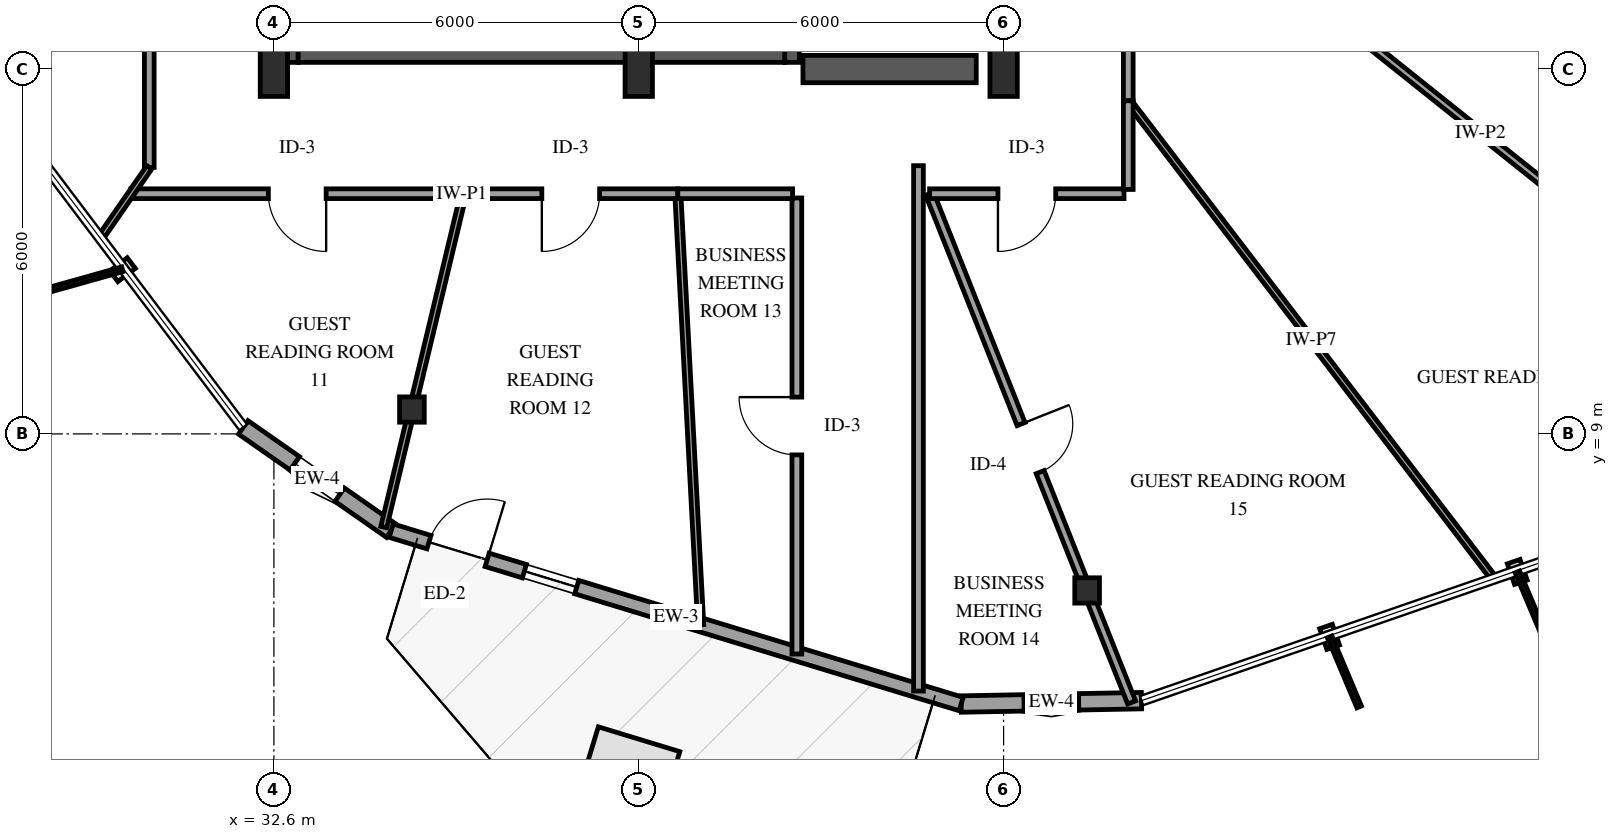
"""IFC4 building model, lengths in metres.
Left out: names, types, materials, properties, quantities, classifications, styles, units other than length and angle.
Written with IfcOpenShell. Run it as: python <this file> out.ifc"""

import sys

from ifc_helpers import new_model, si_unit, direction, frame, frame_2d, origin, origin_2d, place, context, subcontext, project, spatial, rectangle, i_section, extrude, element, fill, save


model = new_model("IFC4")
c1 = context("Model", 3, precision=1e-05, world=origin(), true_north=direction((0.0, 1.0)))
c2 = subcontext(c1, "Body", "Model", "MODEL_VIEW")
j1 = project(units=[si_unit("LENGTHUNIT", "METRE"), si_unit("PLANEANGLEUNIT", "RADIAN")], contexts=[c1])
p1 = place(None, origin())
s1 = spatial("IfcSite", under=j1, at=p1, CompositionType="ELEMENT")
p2 = place(p1, origin())
s2 = spatial("IfcBuilding", under=s1, at=p2, CompositionType="ELEMENT")
p3 = place(p2, frame((0.0, 0.0, 233.8)))
s3 = spatial("IfcBuildingStorey", under=s2, at=p3, CompositionType="ELEMENT", Elevation=233.8)
p4 = place(p3, frame((32.88, 15.11, 0.0), z_axis=(0.0, 0.0, 1.0), x_axis=(0.0, 1.0, 0.0)))
e1 = element("IfcWall", 1, at=p4, inside=s3, PredefinedType="SHEAR", context=c2, shape_type="SweptSolid", body=[
    extrude(rectangle(XDim=3.63, YDim=0.24, at=frame_2d((1.815, 0.0))), origin(), (0.0, 0.0, 1.0), 3.6),
])
p5 = place(p3, frame((41.12, 15.11, 0.0), z_axis=(0.0, 0.0, 1.0), x_axis=(0.0, 1.0, 0.0)))
e2 = element("IfcWall", 2, at=p5, inside=s3, PredefinedType="SHEAR", context=c2, shape_type="SweptSolid", body=[
    extrude(rectangle(XDim=3.63, YDim=0.24, at=frame_2d((1.815, 0.0))), origin(), (0.0, 0.0, 1.0), 3.6),
])
p6 = place(p5, frame((1.255, 0.0, 0.0)))
e3 = element("IfcOpeningElement", 3, at=p6, cuts=e2, PredefinedType="OPENING", context=c2, shape_type="SweptSolid", body=[
    extrude(rectangle(XDim=1.12, YDim=2.15, at=frame_2d((0.56, 1.075))), frame((0.0, 0.13, 0.0), z_axis=(0.0, -1.0, 0.0), x_axis=(1.0, 0.0, 0.0)), (0.0, 0.0, 1.0), 0.26),
])
p7 = place(p3, frame((33.0, 15.23, 0.0), z_axis=(0.0, 0.0, 1.0), x_axis=(1.0, 0.0, 0.0)))
e4 = element("IfcWall", 4, at=p7, inside=s3, PredefinedType="SHEAR", context=c2, shape_type="SweptSolid", body=[
    extrude(rectangle(XDim=8.0, YDim=0.24, at=frame_2d((4.0, 0.0))), origin(), (0.0, 0.0, 1.0), 3.6),
])
p8 = place(p3, frame((41.3, 15.0, 0.0), z_axis=(0.0, 0.0, 1.0), x_axis=(1.0, 0.0, 0.0)))
e5 = element("IfcWall", 5, at=p8, inside=s3, PredefinedType="SHEAR", context=c2, shape_type="SweptSolid", body=[
    extrude(rectangle(XDim=2.85, YDim=0.45, at=frame_2d((1.425, 0.0))), origin(), (0.0, 0.0, 1.0), 3.6),
])
for number, where, z_axis, x_axis in (
    (6, (32.6, 15.0, 0.0), (0.0, 0.0, 1.0), (1.0, 0.0, 0.0)),
    (7, (38.6, 15.0, 0.0), (0.0, 0.0, 1.0), (1.0, 0.0, 0.0)),
    (8, (44.6, 15.0, 0.0), (0.0, 0.0, 1.0), (1.0, 0.0, 0.0)),
):
    element("IfcColumn", number, at=place(p3, frame(where, z_axis=z_axis, x_axis=x_axis)), inside=s3, PredefinedType="PILASTER", context=c2, shape_type="SweptSolid", body=[
        extrude(rectangle(XDim=0.45, YDim=0.9, at=origin_2d()), origin(), (0.0, 0.0, 1.0), 3.6),
    ])
for number, where, z_axis, x_axis in (
    (9, (34.87, 9.401, 0.0), (0.0, 0.0, 1.0), (1.0, 0.0, 0.0)),
    (10, (45.973, 6.426, 0.0), (0.0, 0.0, 1.0), (1.0, 0.0, 0.0)),
):
    element("IfcColumn", number, at=place(p3, frame(where, z_axis=z_axis, x_axis=x_axis)), inside=s3, PredefinedType="COLUMN", context=c2, shape_type="SweptSolid", body=[
        extrude(i_section(OverallWidth=0.406, OverallDepth=0.416, WebThickness=0.03, FlangeThickness=0.048, FilletRadius=0.038, at=origin_2d()), origin(), (0.0, 0.0, 1.0), 3.6),
    ])
p9 = place(p3, frame((32.096, 9.107, 0.0), z_axis=(0.0, 0.0, 1.0), x_axis=(0.81995808367, -0.572423567845, 0.0)))
e11 = element("IfcWall", 11, at=p9, inside=s3, PredefinedType="SOLIDWALL", context=c2, shape_type="SweptSolid", body=[
    extrude(rectangle(XDim=2.967, YDim=0.27, at=frame_2d((1.483, 0.0))), origin(), (0.0, 0.0, 1.0), 2.599),
])
p10 = place(p9, frame((1.033, 0.0, 0.75)))
e12 = element("IfcOpeningElement", 12, at=p10, cuts=e11, PredefinedType="OPENING", context=c2, shape_type="SweptSolid", body=[
    extrude(rectangle(XDim=0.9, YDim=1.5, at=frame_2d((0.45, 0.75))), frame((0.0, 0.145, 0.0), z_axis=(0.0, -1.0, 0.0), x_axis=(1.0, 0.0, 0.0)), (0.0, 0.0, 1.0), 0.29),
])
p11 = place(p3, frame((43.902, 4.558, 0.0), z_axis=(0.0, 0.0, 1.0), x_axis=(0.999822399495, 0.018845940364, 0.0)))
e13 = element("IfcWall", 13, at=p11, inside=s3, PredefinedType="SOLIDWALL", context=c2, shape_type="SweptSolid", body=[
    extrude(rectangle(XDim=2.967, YDim=0.27, at=frame_2d((1.483, 0.0))), origin(), (0.0, 0.0, 1.0), 2.599),
])
p12 = place(p11, frame((1.033, 0.0, 0.75)))
e14 = element("IfcOpeningElement", 14, at=p12, cuts=e13, PredefinedType="OPENING", context=c2, shape_type="SweptSolid", body=[
    extrude(rectangle(XDim=0.9, YDim=1.5, at=frame_2d((0.45, 0.75))), frame((0.0, 0.145, 0.0), z_axis=(0.0, -1.0, 0.0), x_axis=(1.0, 0.0, 0.0)), (0.0, 0.0, 1.0), 0.29),
])
p13 = place(p3, frame((34.528, 7.409, 0.0), z_axis=(0.0, 0.0, 1.0), x_axis=(0.956709483024, -0.29104461014, 0.0)))
e15 = element("IfcWall", 15, at=p13, inside=s3, PredefinedType="SOLIDWALL", context=c2, shape_type="SweptSolid", body=[
    extrude(rectangle(XDim=9.798, YDim=0.23, at=frame_2d((4.899, 0.0))), origin(), (0.0, 0.0, 1.0), 2.599),
])
p14 = place(p13, frame((0.65, 0.0, 0.0)))
e16 = element("IfcOpeningElement", 16, at=p14, cuts=e15, PredefinedType="OPENING", context=c2, shape_type="SweptSolid", body=[
    extrude(rectangle(XDim=1.0, YDim=2.15, at=frame_2d((0.5, 1.075))), frame((0.0, 0.125, 0.0), z_axis=(0.0, -1.0, 0.0), x_axis=(1.0, 0.0, 0.0)), (0.0, 0.0, 1.0), 0.25),
])
p15 = place(p13, frame((2.29, 0.0, 0.72)))
e17 = element("IfcOpeningElement", 17, at=p15, cuts=e15, PredefinedType="OPENING", context=c2, shape_type="SweptSolid", body=[
    extrude(rectangle(XDim=0.9, YDim=1.5, at=frame_2d((0.45, 0.75))), frame((0.0, 0.125, 0.0), z_axis=(0.0, -1.0, 0.0), x_axis=(1.0, 0.0, 0.0)), (0.0, 0.0, 1.0), 0.25),
])
p16 = place(p3, frame((46.65, 18.573, 0.0), z_axis=(0.0, 0.0, 1.0), x_axis=(0.781506613228, -0.623896957423, 0.0)))
e18 = element("IfcWall", 18, at=p16, inside=s3, PredefinedType="PARTITIONING", context=c2, shape_type="SweptSolid", body=[
    extrude(rectangle(XDim=14.816, YDim=0.12, at=frame_2d((7.408, 0.0))), origin(), (0.0, 0.0, 1.0), 3.26),
])
p17 = place(p3, frame((46.65, 14.478, 0.0), z_axis=(0.0, 0.0, 1.0), x_axis=(0.60761033938, -0.794235277156, 0.0)))
e19 = element("IfcWall", 19, at=p17, inside=s3, PredefinedType="PARTITIONING", context=c2, shape_type="SweptSolid", body=[
    extrude(rectangle(XDim=9.896, YDim=0.1, at=frame_2d((4.948, 0.0))), origin(), (0.0, 0.0, 1.0), 3.26),
])
p18 = place(p3, frame((43.383, 12.95, 0.0), z_axis=(0.0, 0.0, 1.0), x_axis=(0.369056032082, -0.929407147156, 0.0)))
e20 = element("IfcWall", 20, at=p18, inside=s3, PredefinedType="PARTITIONING", context=c2, shape_type="SweptSolid", body=[
    extrude(rectangle(XDim=9.001, YDim=0.14, at=frame_2d((4.501, 0.0))), origin(), (0.0, 0.0, 1.0), 2.515),
])
p19 = place(p18, frame((4.076, 0.0, 0.0)))
e21 = element("IfcOpeningElement", 21, at=p19, cuts=e20, PredefinedType="OPENING", context=c2, shape_type="SweptSolid", body=[
    extrude(rectangle(XDim=0.85, YDim=2.1, at=frame_2d((0.425, 1.05))), frame((0.0, 0.08, 0.0), z_axis=(0.0, -1.0, 0.0), x_axis=(1.0, 0.0, 0.0)), (0.0, 0.0, 1.0), 0.16),
])
p20 = place(p3, frame((41.2, 5.38, 0.0), z_axis=(0.0, 0.0, 1.0), x_axis=(0.0, 1.0, 0.0)))
e22 = element("IfcWall", 22, at=p20, inside=s3, PredefinedType="PARTITIONING", context=c2, shape_type="SweptSolid", body=[
    extrude(rectangle(XDim=7.5, YDim=0.16, at=frame_2d((3.75, 0.0))), origin(), (0.0, 0.0, 1.0), 3.26),
])
p21 = place(p20, frame((3.275, 0.0, 0.0)))
e23 = element("IfcOpeningElement", 23, at=p21, cuts=e22, PredefinedType="OPENING", context=c2, shape_type="SweptSolid", body=[
    extrude(rectangle(XDim=0.95, YDim=2.15, at=frame_2d((0.475, 1.075))), frame((0.0, 0.09, 0.0), z_axis=(0.0, -1.0, 0.0), x_axis=(1.0, 0.0, 0.0)), (0.0, 0.0, 1.0), 0.18),
])
p22 = place(p3, frame((39.242, 12.95, 0.0), z_axis=(0.0, 0.0, 1.0), x_axis=(0.053100347705, -0.998589181332, 0.0)))
e24 = element("IfcWall", 24, at=p22, inside=s3, PredefinedType="PARTITIONING", context=c2, shape_type="SweptSolid", body=[
    extrude(rectangle(XDim=7.099, YDim=0.1, at=frame_2d((3.549, 0.0))), origin(), (0.0, 0.0, 1.0), 3.26),
])
p23 = place(p3, frame((30.55, 13.383, 0.0), z_axis=(0.0, 0.0, 1.0), x_axis=(0.0, 1.0, 0.0)))
e25 = element("IfcWall", 25, at=p23, inside=s3, PredefinedType="PARTITIONING", context=c2, shape_type="SweptSolid", body=[
    extrude(rectangle(XDim=6.723, YDim=0.16, at=frame_2d((3.361, 0.0))), origin(), (0.0, 0.0, 1.0), 3.26),
])
p24 = place(p23, frame((2.887, 0.0, 0.0)))
e26 = element("IfcOpeningElement", 26, at=p24, cuts=e25, PredefinedType="OPENING", context=c2, shape_type="SweptSolid", body=[
    extrude(rectangle(XDim=0.95, YDim=2.15, at=frame_2d((0.475, 1.075))), frame((0.0, 0.09, 0.0), z_axis=(0.0, -1.0, 0.0), x_axis=(1.0, 0.0, 0.0)), (0.0, 0.0, 1.0), 0.18),
])
p25 = place(p3, frame((35.719, 12.95, 0.0), z_axis=(0.0, 0.0, 1.0), x_axis=(-0.232760243662, -0.972534147971, 0.0)))
e27 = element("IfcWall", 27, at=p25, inside=s3, PredefinedType="PARTITIONING", context=c2, shape_type="SweptSolid", body=[
    extrude(rectangle(XDim=5.637, YDim=0.1, at=frame_2d((2.818, 0.0))), origin(), (0.0, 0.0, 1.0), 2.515),
])
p26 = place(p3, frame((35.719, 12.95, 0.0), z_axis=(0.0, 0.0, 1.0), x_axis=(-1.0, 0.0, 0.0)))
e28 = element("IfcWall", 28, at=p26, inside=s3, PredefinedType="PARTITIONING", context=c2, shape_type="SweptSolid", body=[
    extrude(rectangle(XDim=5.469, YDim=0.16, at=frame_2d((2.734, 0.0))), origin(), (0.0, 0.0, 1.0), 3.26),
])
p27 = place(p26, frame((2.26, 0.0, 0.0)))
e29 = element("IfcOpeningElement", 29, at=p27, cuts=e28, PredefinedType="OPENING", context=c2, shape_type="SweptSolid", body=[
    extrude(rectangle(XDim=0.95, YDim=2.15, at=frame_2d((0.475, 1.075))), frame((0.0, 0.09, 0.0), z_axis=(0.0, -1.0, 0.0), x_axis=(1.0, 0.0, 0.0)), (0.0, 0.0, 1.0), 0.18),
])
p28 = place(p3, frame((46.65, 18.573, 0.0), z_axis=(0.0, 0.0, 1.0), x_axis=(0.0, -1.0, 0.0)))
e30 = element("IfcWall", 30, at=p28, inside=s3, PredefinedType="PARTITIONING", context=c2, shape_type="SweptSolid", body=[
    extrude(rectangle(XDim=4.095, YDim=0.16, at=frame_2d((2.047, 0.0))), origin(), (0.0, 0.0, 1.0), 3.26),
])
p29 = place(p28, frame((1.573, 0.0, 0.0)))
e31 = element("IfcOpeningElement", 31, at=p29, cuts=e30, PredefinedType="OPENING", context=c2, shape_type="SweptSolid", body=[
    extrude(rectangle(XDim=0.95, YDim=2.15, at=frame_2d((0.475, 1.075))), frame((0.0, 0.09, 0.0), z_axis=(0.0, -1.0, 0.0), x_axis=(1.0, 0.0, 0.0)), (0.0, 0.0, 1.0), 0.18),
])
p30 = place(p3, frame((39.242, 12.95, 0.0), z_axis=(0.0, 0.0, 1.0), x_axis=(-1.0, 0.0, 0.0)))
e32 = element("IfcWall", 32, at=p30, inside=s3, PredefinedType="PARTITIONING", context=c2, shape_type="SweptSolid", body=[
    extrude(rectangle(XDim=3.523, YDim=0.16, at=frame_2d((1.761, 0.0))), origin(), (0.0, 0.0, 1.0), 3.26),
])
p31 = place(p30, frame((1.286, 0.0, 0.0)))
e33 = element("IfcOpeningElement", 33, at=p31, cuts=e32, PredefinedType="OPENING", context=c2, shape_type="SweptSolid", body=[
    extrude(rectangle(XDim=0.95, YDim=2.15, at=frame_2d((0.475, 1.075))), frame((0.0, 0.09, 0.0), z_axis=(0.0, -1.0, 0.0), x_axis=(1.0, 0.0, 0.0)), (0.0, 0.0, 1.0), 0.18),
])
p32 = place(p3, frame((46.58, 12.95, 0.0), z_axis=(0.0, 0.0, 1.0), x_axis=(-1.0, 0.0, 0.0)))
e34 = element("IfcWall", 34, at=p32, inside=s3, PredefinedType="PARTITIONING", context=c2, shape_type="SweptSolid", body=[
    extrude(rectangle(XDim=3.197, YDim=0.16, at=frame_2d((1.599, 0.0))), origin(), (0.0, 0.0, 1.0), 3.26),
])
p33 = place(p32, frame((1.123, 0.0, 0.0)))
e35 = element("IfcOpeningElement", 35, at=p33, cuts=e34, PredefinedType="OPENING", context=c2, shape_type="SweptSolid", body=[
    extrude(rectangle(XDim=0.95, YDim=2.15, at=frame_2d((0.475, 1.075))), frame((0.0, 0.09, 0.0), z_axis=(0.0, -1.0, 0.0), x_axis=(1.0, 0.0, 0.0)), (0.0, 0.0, 1.0), 0.18),
])
p34 = place(p3, frame((41.13, 12.95, 0.0), z_axis=(0.0, 0.0, 1.0), x_axis=(-1.0, 0.0, 0.0)))
e36 = element("IfcWall", 36, at=p34, inside=s3, PredefinedType="PARTITIONING", context=c2, shape_type="SweptSolid", body=[
    extrude(rectangle(XDim=1.888, YDim=0.16, at=frame_2d((0.944, 0.0))), origin(), (0.0, 0.0, 1.0), 3.26),
])
p35 = place(p3, frame((46.65, 14.478, 0.0), z_axis=(0.0, 0.0, 1.0), x_axis=(0.0, -1.0, 0.0)))
e37 = element("IfcWall", 37, at=p35, inside=s3, PredefinedType="PARTITIONING", context=c2, shape_type="SweptSolid", body=[
    extrude(rectangle(XDim=1.458, YDim=0.16, at=frame_2d((0.729, 0.0))), origin(), (0.0, 0.0, 1.0), 3.26),
])
p36 = place(p3, frame((30.55, 13.383, 0.0), z_axis=(0.0, 0.0, 1.0), x_axis=(-0.569335494983, -0.822105281672, 0.0)))
e38 = element("IfcWall", 38, at=p36, inside=s3, PredefinedType="PARTITIONING", context=c2, shape_type="SweptSolid", body=[
    extrude(rectangle(XDim=1.416, YDim=0.1, at=frame_2d((0.708, 0.0))), origin(), (0.0, 0.0, 1.0), 3.26),
])
p37 = place(p3, frame((43.2, 13.411, 0.0), z_axis=(0.0, 0.0, 1.0), x_axis=(0.0, -1.0, 0.0)))
e39 = element("IfcWall", 39, at=p37, inside=s3, PredefinedType="PARTITIONING", context=c2, shape_type="SweptSolid", body=[
    extrude(rectangle(XDim=8.64, YDim=0.16, at=frame_2d((4.32, 0.0))), origin(), (0.0, 0.0, 1.0), 2.598),
])
p38 = place(p10, origin())
e40 = element("IfcWindow", 40, at=p38, inside=s3, PartitioningType="SINGLE_PANEL", PredefinedType="WINDOW", context=c2, shape_type="SweptSolid", body=[
    extrude(rectangle(XDim=0.9, YDim=1.5, at=frame_2d((0.45, 0.75))), frame((0.0, 0.03, 0.0), z_axis=(0.0, -1.0, 0.0), x_axis=(1.0, 0.0, 0.0)), (0.0, 0.0, 1.0), 0.06),
])
fill(e12, e40)
p39 = place(p12, origin())
e41 = element("IfcWindow", 41, at=p39, inside=s3, PartitioningType="SINGLE_PANEL", PredefinedType="WINDOW", context=c2, shape_type="SweptSolid", body=[
    extrude(rectangle(XDim=0.9, YDim=1.5, at=frame_2d((0.45, 0.75))), frame((0.0, 0.03, 0.0), z_axis=(0.0, -1.0, 0.0), x_axis=(1.0, 0.0, 0.0)), (0.0, 0.0, 1.0), 0.06),
])
fill(e14, e41)
p40 = place(p14, origin())
e42 = element("IfcDoor", 42, at=p40, inside=s3, OperationType="SINGLE_SWING_RIGHT", PredefinedType="DOOR", context=c2, shape_type="SweptSolid", body=[
    extrude(rectangle(XDim=1.0, YDim=2.15, at=frame_2d((0.5, 1.075))), frame((0.0, 0.025, 0.0), z_axis=(0.0, -1.0, 0.0), x_axis=(1.0, 0.0, 0.0)), (0.0, 0.0, 1.0), 0.05),
])
fill(e16, e42)
p41 = place(p15, origin())
e43 = element("IfcWindow", 43, at=p41, inside=s3, PartitioningType="SINGLE_PANEL", PredefinedType="WINDOW", context=c2, shape_type="SweptSolid", body=[
    extrude(rectangle(XDim=0.9, YDim=1.5, at=frame_2d((0.45, 0.75))), frame((0.0, 0.03, 0.0), z_axis=(0.0, -1.0, 0.0), x_axis=(1.0, 0.0, 0.0)), (0.0, 0.0, 1.0), 0.06),
])
fill(e17, e43)
p42 = place(p19, origin())
e44 = element("IfcDoor", 44, at=p42, inside=s3, OperationType="SINGLE_SWING_LEFT", PredefinedType="DOOR", context=c2, shape_type="SweptSolid", body=[
    extrude(rectangle(XDim=0.85, YDim=2.1, at=frame_2d((0.425, 1.05))), frame((0.0, 0.025, 0.0), z_axis=(0.0, -1.0, 0.0), x_axis=(1.0, 0.0, 0.0)), (0.0, 0.0, 1.0), 0.05),
])
fill(e21, e44)
p43 = place(p21, origin())
e45 = element("IfcDoor", 45, at=p43, inside=s3, OperationType="SINGLE_SWING_RIGHT", PredefinedType="DOOR", context=c2, shape_type="SweptSolid", body=[
    extrude(rectangle(XDim=0.95, YDim=2.15, at=frame_2d((0.475, 1.075))), frame((0.0, 0.025, 0.0), z_axis=(0.0, -1.0, 0.0), x_axis=(1.0, 0.0, 0.0)), (0.0, 0.0, 1.0), 0.05),
])
fill(e23, e45)
p44 = place(p27, origin())
e46 = element("IfcDoor", 46, at=p44, inside=s3, OperationType="SINGLE_SWING_LEFT", PredefinedType="DOOR", context=c2, shape_type="SweptSolid", body=[
    extrude(rectangle(XDim=0.95, YDim=2.15, at=frame_2d((0.475, 1.075))), frame((0.0, 0.025, 0.0), z_axis=(0.0, -1.0, 0.0), x_axis=(1.0, 0.0, 0.0)), (0.0, 0.0, 1.0), 0.05),
])
fill(e29, e46)
p45 = place(p31, origin())
e47 = element("IfcDoor", 47, at=p45, inside=s3, OperationType="SINGLE_SWING_RIGHT", PredefinedType="DOOR", context=c2, shape_type="SweptSolid", body=[
    extrude(rectangle(XDim=0.95, YDim=2.15, at=frame_2d((0.475, 1.075))), frame((0.0, 0.025, 0.0), z_axis=(0.0, -1.0, 0.0), x_axis=(1.0, 0.0, 0.0)), (0.0, 0.0, 1.0), 0.05),
])
fill(e33, e47)
p46 = place(p33, origin())
e48 = element("IfcDoor", 48, at=p46, inside=s3, OperationType="SINGLE_SWING_RIGHT", PredefinedType="DOOR", context=c2, shape_type="SweptSolid", body=[
    extrude(rectangle(XDim=0.95, YDim=2.15, at=frame_2d((0.475, 1.075))), frame((0.0, 0.025, 0.0), z_axis=(0.0, -1.0, 0.0), x_axis=(1.0, 0.0, 0.0)), (0.0, 0.0, 1.0), 0.05),
])
fill(e35, e48)
save(model, sys.argv[1])
